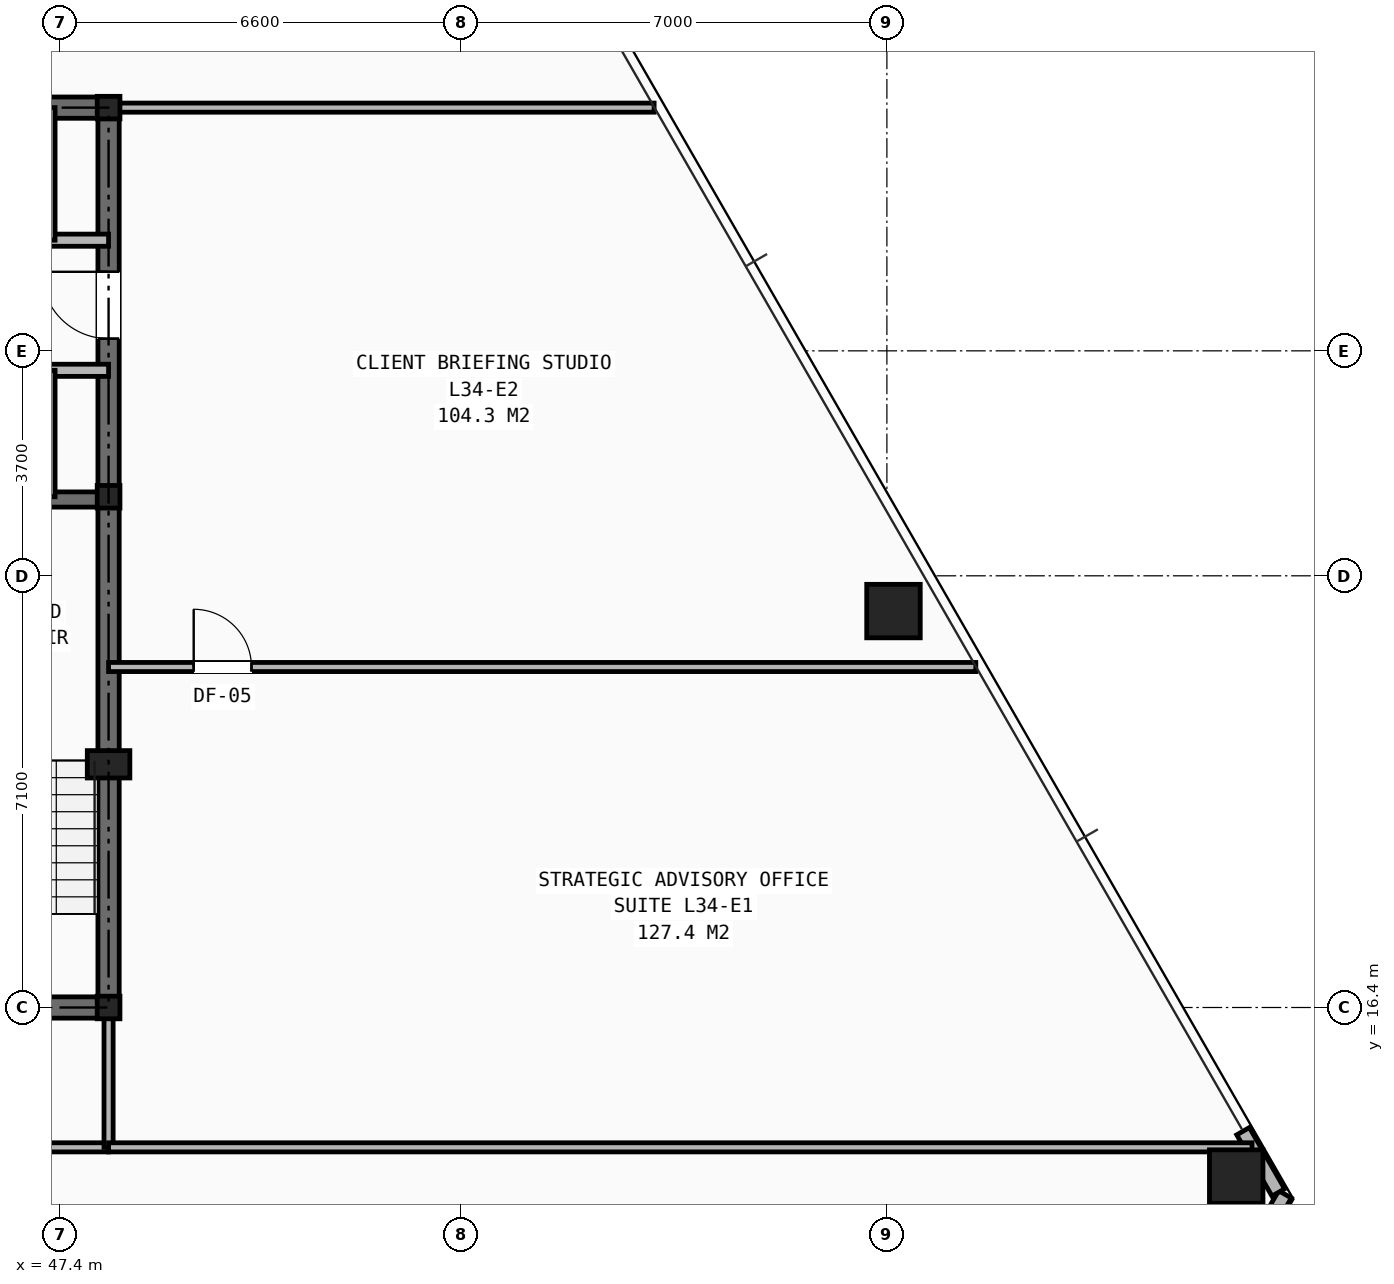
"""IFC4 building model, lengths in metres.
Left out: names, types, materials, properties, quantities, classifications, styles, units other than length and angle.
Written with IfcOpenShell. Run it as: python <this file> out.ifc"""

import sys

from ifc_helpers import new_model, si_unit, direction, frame, frame_2d, origin, origin_2d, place, context, subcontext, project, spatial, rectangle, hollow_rectangle, i_section, extrude, element, fill, save


model = new_model("IFC4")
c1 = context("Model", 3, precision=1e-05, world=origin(), true_north=direction((0.0, 1.0)))
c2 = subcontext(c1, "Body", "Model", "MODEL_VIEW")
j1 = project(units=[si_unit("LENGTHUNIT", "METRE"), si_unit("PLANEANGLEUNIT", "RADIAN")], contexts=[c1])
p1 = place(None, origin())
s1 = spatial("IfcSite", under=j1, at=p1, CompositionType="ELEMENT")
p2 = place(p1, origin())
s2 = spatial("IfcBuilding", under=s1, at=p2, CompositionType="ELEMENT")
p3 = place(p2, frame((0.0, 0.0, 119.45)))
s3 = spatial("IfcBuildingStorey", under=s2, at=p3, CompositionType="ELEMENT", Elevation=119.45)
for number, where, z_axis, x_axis in (
    (1, (48.2, 16.4, 0.0), (0.0, 0.0, 1.0), (1.0, 0.0, 0.0)),
    (2, (48.2, 24.8, 0.0), (0.0, 0.0, 1.0), (1.0, 0.0, 0.0)),
    (3, (48.2, 31.2, 0.0), (0.0, 0.0, 1.0), (1.0, 0.0, 0.0)),
):
    element("IfcColumn", number, at=place(p3, frame(where, z_axis=z_axis, x_axis=x_axis)), inside=s3, PredefinedType="COLUMN", context=c2, shape_type="SweptSolid", body=[
        extrude(i_section(OverallWidth=0.374, OverallDepth=0.372, WebThickness=0.016, FlangeThickness=0.026, at=origin_2d()), origin(), (0.0, 0.0, 1.0), 3.45),
    ])
p4 = place(p3, frame((48.2, 20.4, 0.0), z_axis=(0.0, 0.0, 1.0), x_axis=(1.0, 0.0, 0.0)))
e4 = element("IfcColumn", 4, at=p4, inside=s3, PredefinedType="PILASTER", context=c2, shape_type="SweptSolid", body=[
    extrude(rectangle(XDim=0.7, YDim=0.45, at=origin_2d()), origin(), (0.0, 0.0, 1.0), 3.45),
])
for number, where, z_axis, x_axis in (
    (5, (66.745, 13.619, 0.0), (0.0, 0.0, 1.0), (1.0, 0.0, 0.0)),
    (6, (61.108, 22.92, 0.0), (0.0, 0.0, 1.0), (1.0, 0.0, 0.0)),
):
    element("IfcColumn", number, at=place(p3, frame(where, z_axis=z_axis, x_axis=x_axis)), inside=s3, PredefinedType="COLUMN", context=c2, shape_type="SweptSolid", body=[
        extrude(hollow_rectangle(XDim=0.88, YDim=0.88, WallThickness=0.06, at=origin_2d()), origin(), (0.0, 0.0, 1.0), 3.45),
    ])
p5 = place(p3, frame((67.547, 13.327, 0.0), z_axis=(0.0, 0.0, 1.0), x_axis=(-0.499998917442, -0.866026028799, 0.0)))
e7 = element("IfcWall", 7, at=p5, inside=s3, PredefinedType="SHEAR", context=c2, shape_type="SweptSolid", body=[
    extrude(rectangle(XDim=8.714, YDim=0.24, at=frame_2d((4.357, 0.0))), origin(), (0.0, 0.0, 1.0), 2.583),
])
p6 = place(p3, frame((67.438, 13.358, 0.0), z_axis=(0.0, 0.0, 1.0), x_axis=(-0.498625017703, 0.866817796149, 0.0)))
e8 = element("IfcWall", 8, at=p6, inside=s3, PredefinedType="SHEAR", context=c2, shape_type="SweptSolid", body=[
    extrude(rectangle(XDim=1.162, YDim=0.24, at=frame_2d((0.581, 0.0))), origin(), (0.0, 0.0, 1.0), 2.583),
])
p7 = place(p3, frame((31.8, 16.4, 0.0), z_axis=(0.0, 0.0, 1.0), x_axis=(1.0, 0.0, 0.0)))
e9 = element("IfcWall", 9, at=p7, inside=s3, PredefinedType="SHEAR", context=c2, shape_type="SweptSolid", body=[
    extrude(rectangle(XDim=16.4, YDim=0.35, at=frame_2d((8.2, 0.0))), origin(), (0.0, 0.0, 1.0), 3.21),
])
p8 = place(p7, frame((4.2, 0.0, 0.0)))
e10 = element("IfcOpeningElement", 10, at=p8, cuts=e9, PredefinedType="OPENING", context=c2, shape_type="SweptSolid", body=[
    extrude(rectangle(XDim=0.95, YDim=2.1, at=frame_2d((0.475, 1.05))), frame((0.0, 0.185, 0.0), z_axis=(0.0, -1.0, 0.0), x_axis=(1.0, 0.0, 0.0)), (0.0, 0.0, 1.0), 0.37),
])
p9 = place(p7, frame((10.6, 0.0, 0.0)))
e11 = element("IfcOpeningElement", 11, at=p9, cuts=e9, PredefinedType="OPENING", context=c2, shape_type="SweptSolid", body=[
    extrude(rectangle(XDim=0.95, YDim=2.1, at=frame_2d((0.475, 1.05))), frame((0.0, 0.185, 0.0), z_axis=(0.0, -1.0, 0.0), x_axis=(1.0, 0.0, 0.0)), (0.0, 0.0, 1.0), 0.37),
])
p10 = place(p3, frame((31.8, 31.2, 0.0), z_axis=(0.0, 0.0, 1.0), x_axis=(1.0, 0.0, 0.0)))
e12 = element("IfcWall", 12, at=p10, inside=s3, PredefinedType="SHEAR", context=c2, shape_type="SweptSolid", body=[
    extrude(rectangle(XDim=16.4, YDim=0.35, at=frame_2d((8.2, 0.0))), origin(), (0.0, 0.0, 1.0), 3.21),
])
p11 = place(p3, frame((48.2, 16.4, 0.0), z_axis=(0.0, 0.0, 1.0), x_axis=(0.0, 1.0, 0.0)))
e13 = element("IfcWall", 13, at=p11, inside=s3, PredefinedType="SHEAR", context=c2, shape_type="SweptSolid", body=[
    extrude(rectangle(XDim=14.8, YDim=0.35, at=frame_2d((7.4, 0.0))), origin(), (0.0, 0.0, 1.0), 3.21),
])
p12 = place(p11, frame((11.0, 0.0, 0.0)))
e14 = element("IfcOpeningElement", 14, at=p12, cuts=e13, PredefinedType="OPENING", context=c2, shape_type="SweptSolid", body=[
    extrude(rectangle(XDim=1.1, YDim=2.15, at=frame_2d((0.55, 1.075))), frame((0.0, 0.185, 0.0), z_axis=(0.0, -1.0, 0.0), x_axis=(1.0, 0.0, 0.0)), (0.0, 0.0, 1.0), 0.37),
])
p13 = place(p3, frame((44.955, 24.755, 0.0), z_axis=(0.0, 0.0, 1.0), x_axis=(1.0, 0.0, 0.0)))
e15 = element("IfcWall", 15, at=p13, inside=s3, PredefinedType="SHEAR", context=c2, shape_type="SweptSolid", body=[
    extrude(rectangle(XDim=3.245, YDim=0.25, at=frame_2d((1.623, 0.0))), origin(), (0.0, 0.0, 1.0), 3.21),
])
p14 = place(p3, frame((33.82, 29.02, 0.0), z_axis=(0.0, 0.0, 1.0), x_axis=(1.0, 0.0, 0.0)))
e16 = element("IfcWall", 16, at=p14, inside=s3, PredefinedType="SOLIDWALL", context=c2, shape_type="SweptSolid", body=[
    extrude(rectangle(XDim=14.38, YDim=0.2, at=frame_2d((7.19, 0.0))), origin(), (0.0, 0.0, 1.0), 2.661),
])
p15 = place(p14, frame((3.92, 0.0, 0.0)))
e17 = element("IfcOpeningElement", 17, at=p15, cuts=e16, PredefinedType="OPENING", context=c2, shape_type="SweptSolid", body=[
    extrude(rectangle(XDim=0.9, YDim=2.1, at=frame_2d((0.45, 1.05))), frame((0.0, 0.11, 0.0), z_axis=(0.0, -1.0, 0.0), x_axis=(1.0, 0.0, 0.0)), (0.0, 0.0, 1.0), 0.22),
])
p16 = place(p3, frame((33.82, 26.88, 0.0), z_axis=(0.0, 0.0, 1.0), x_axis=(1.0, 0.0, 0.0)))
e18 = element("IfcWall", 18, at=p16, inside=s3, PredefinedType="SOLIDWALL", context=c2, shape_type="SweptSolid", body=[
    extrude(rectangle(XDim=14.38, YDim=0.2, at=frame_2d((7.19, 0.0))), origin(), (0.0, 0.0, 1.0), 2.661),
])
p17 = place(p16, frame((0.53, 0.0, 0.0)))
e19 = element("IfcOpeningElement", 19, at=p17, cuts=e18, PredefinedType="OPENING", context=c2, shape_type="SweptSolid", body=[
    extrude(rectangle(XDim=1.1, YDim=2.15, at=frame_2d((0.55, 1.075))), frame((0.0, 0.11, 0.0), z_axis=(0.0, -1.0, 0.0), x_axis=(1.0, 0.0, 0.0)), (0.0, 0.0, 1.0), 0.22),
])
p18 = place(p16, frame((2.69, 0.0, 0.0)))
e20 = element("IfcOpeningElement", 20, at=p18, cuts=e18, PredefinedType="OPENING", context=c2, shape_type="SweptSolid", body=[
    extrude(rectangle(XDim=1.1, YDim=2.15, at=frame_2d((0.55, 1.075))), frame((0.0, 0.11, 0.0), z_axis=(0.0, -1.0, 0.0), x_axis=(1.0, 0.0, 0.0)), (0.0, 0.0, 1.0), 0.22),
])
p19 = place(p16, frame((4.85, 0.0, 0.0)))
e21 = element("IfcOpeningElement", 21, at=p19, cuts=e18, PredefinedType="OPENING", context=c2, shape_type="SweptSolid", body=[
    extrude(rectangle(XDim=1.1, YDim=2.15, at=frame_2d((0.55, 1.075))), frame((0.0, 0.11, 0.0), z_axis=(0.0, -1.0, 0.0), x_axis=(1.0, 0.0, 0.0)), (0.0, 0.0, 1.0), 0.22),
])
p20 = place(p16, frame((7.01, 0.0, 0.0)))
e22 = element("IfcOpeningElement", 22, at=p20, cuts=e18, PredefinedType="OPENING", context=c2, shape_type="SweptSolid", body=[
    extrude(rectangle(XDim=1.1, YDim=2.15, at=frame_2d((0.55, 1.075))), frame((0.0, 0.11, 0.0), z_axis=(0.0, -1.0, 0.0), x_axis=(1.0, 0.0, 0.0)), (0.0, 0.0, 1.0), 0.22),
])
p21 = place(p3, frame((47.24, 29.02, 0.0), z_axis=(0.0, 0.0, 1.0), x_axis=(0.0, 1.0, 0.0)))
e23 = element("IfcWall", 23, at=p21, inside=s3, PredefinedType="SOLIDWALL", context=c2, shape_type="SweptSolid", body=[
    extrude(rectangle(XDim=2.18, YDim=0.16, at=frame_2d((1.09, 0.0))), origin(), (0.0, 0.0, 1.0), 2.661),
])
p22 = place(p3, frame((47.24, 24.8, 0.0), z_axis=(0.0, 0.0, 1.0), x_axis=(0.0, 1.0, 0.0)))
e24 = element("IfcWall", 24, at=p22, inside=s3, PredefinedType="SOLIDWALL", context=c2, shape_type="SweptSolid", body=[
    extrude(rectangle(XDim=2.08, YDim=0.16, at=frame_2d((1.04, 0.0))), origin(), (0.0, 0.0, 1.0), 3.21),
])
p23 = place(p3, frame((29.6, 14.1, 0.0), z_axis=(0.0, 0.0, 1.0), x_axis=(1.0, 0.0, 0.0)))
e25 = element("IfcWall", 25, at=p23, inside=s3, PredefinedType="PARTITIONING", context=c2, shape_type="SweptSolid", body=[
    extrude(rectangle(XDim=18.6, YDim=0.15, at=frame_2d((9.3, 0.0))), origin(), (0.0, 0.0, 1.0), 2.252),
])
p24 = place(p23, frame((0.55, 0.0, 0.0)))
e26 = element("IfcOpeningElement", 26, at=p24, cuts=e25, PredefinedType="OPENING", context=c2, shape_type="SweptSolid", body=[
    extrude(rectangle(XDim=0.95, YDim=2.1, at=frame_2d((0.475, 1.05))), frame((0.0, 0.085, 0.0), z_axis=(0.0, -1.0, 0.0), x_axis=(1.0, 0.0, 0.0)), (0.0, 0.0, 1.0), 0.17),
])
p25 = place(p23, frame((7.25, 0.0, 0.0)))
e27 = element("IfcOpeningElement", 27, at=p25, cuts=e25, PredefinedType="OPENING", context=c2, shape_type="SweptSolid", body=[
    extrude(rectangle(XDim=0.95, YDim=2.1, at=frame_2d((0.475, 1.05))), frame((0.0, 0.085, 0.0), z_axis=(0.0, -1.0, 0.0), x_axis=(1.0, 0.0, 0.0)), (0.0, 0.0, 1.0), 0.17),
])
p26 = place(p23, frame((13.75, 0.0, 0.0)))
e28 = element("IfcOpeningElement", 28, at=p26, cuts=e25, PredefinedType="OPENING", context=c2, shape_type="SweptSolid", body=[
    extrude(rectangle(XDim=0.95, YDim=2.1, at=frame_2d((0.475, 1.05))), frame((0.0, 0.085, 0.0), z_axis=(0.0, -1.0, 0.0), x_axis=(1.0, 0.0, 0.0)), (0.0, 0.0, 1.0), 0.17),
])
p27 = place(p3, frame((48.2, 14.1, 0.0), z_axis=(0.0, 0.0, 1.0), x_axis=(0.0, 1.0, 0.0)))
e29 = element("IfcWall", 29, at=p27, inside=s3, PredefinedType="PARTITIONING", context=c2, shape_type="SweptSolid", body=[
    extrude(rectangle(XDim=2.3, YDim=0.15, at=frame_2d((1.15, 0.0))), origin(), (0.0, 0.0, 1.0), 2.661),
])
p28 = place(p3, frame((48.2, 31.2, 0.0), z_axis=(0.0, 0.0, 1.0), x_axis=(1.0, 0.0, 0.0)))
e30 = element("IfcWall", 30, at=p28, inside=s3, PredefinedType="PARTITIONING", context=c2, shape_type="SweptSolid", body=[
    extrude(rectangle(XDim=8.972, YDim=0.15, at=frame_2d((4.486, 0.0))), origin(), (0.0, 0.0, 1.0), 2.252),
])
p29 = place(p3, frame((48.2, 14.1, 0.0), z_axis=(0.0, 0.0, 1.0), x_axis=(1.0, 0.0, 0.0)))
e31 = element("IfcWall", 31, at=p29, inside=s3, PredefinedType="PARTITIONING", context=c2, shape_type="SweptSolid", body=[
    extrude(rectangle(XDim=18.805, YDim=0.15, at=frame_2d((9.402, 0.0))), origin(), (0.0, 0.0, 1.0), 2.589),
])
p30 = place(p3, frame((48.2, 22.0, 0.0), z_axis=(0.0, 0.0, 1.0), x_axis=(1.0, 0.0, 0.0)))
e32 = element("IfcWall", 32, at=p30, inside=s3, PredefinedType="PARTITIONING", context=c2, shape_type="SweptSolid", body=[
    extrude(rectangle(XDim=14.262, YDim=0.15, at=frame_2d((7.131, 0.0))), origin(), (0.0, 0.0, 1.0), 2.589),
])
p31 = place(p30, frame((1.4, 0.0, 0.0)))
e33 = element("IfcOpeningElement", 33, at=p31, cuts=e32, PredefinedType="OPENING", context=c2, shape_type="SweptSolid", body=[
    extrude(rectangle(XDim=0.95, YDim=2.1, at=frame_2d((0.475, 1.05))), frame((0.0, 0.085, 0.0), z_axis=(0.0, -1.0, 0.0), x_axis=(1.0, 0.0, 0.0)), (0.0, 0.0, 1.0), 0.17),
])
p32 = place(p12, origin())
e34 = element("IfcDoor", 34, at=p32, inside=s3, OperationType="SINGLE_SWING_RIGHT", PredefinedType="DOOR", context=c2, shape_type="SweptSolid", body=[
    extrude(rectangle(XDim=1.1, YDim=2.15, at=frame_2d((0.55, 1.075))), frame((0.0, 0.025, 0.0), z_axis=(0.0, -1.0, 0.0), x_axis=(1.0, 0.0, 0.0)), (0.0, 0.0, 1.0), 0.05),
])
fill(e14, e34)
p33 = place(p31, origin())
e35 = element("IfcDoor", 35, at=p33, inside=s3, OperationType="SINGLE_SWING_LEFT", PredefinedType="DOOR", context=c2, shape_type="SweptSolid", body=[
    extrude(rectangle(XDim=0.95, YDim=2.1, at=frame_2d((0.475, 1.05))), frame((0.0, 0.025, 0.0), z_axis=(0.0, -1.0, 0.0), x_axis=(1.0, 0.0, 0.0)), (0.0, 0.0, 1.0), 0.05),
])
fill(e33, e35)
save(model, sys.argv[1])
